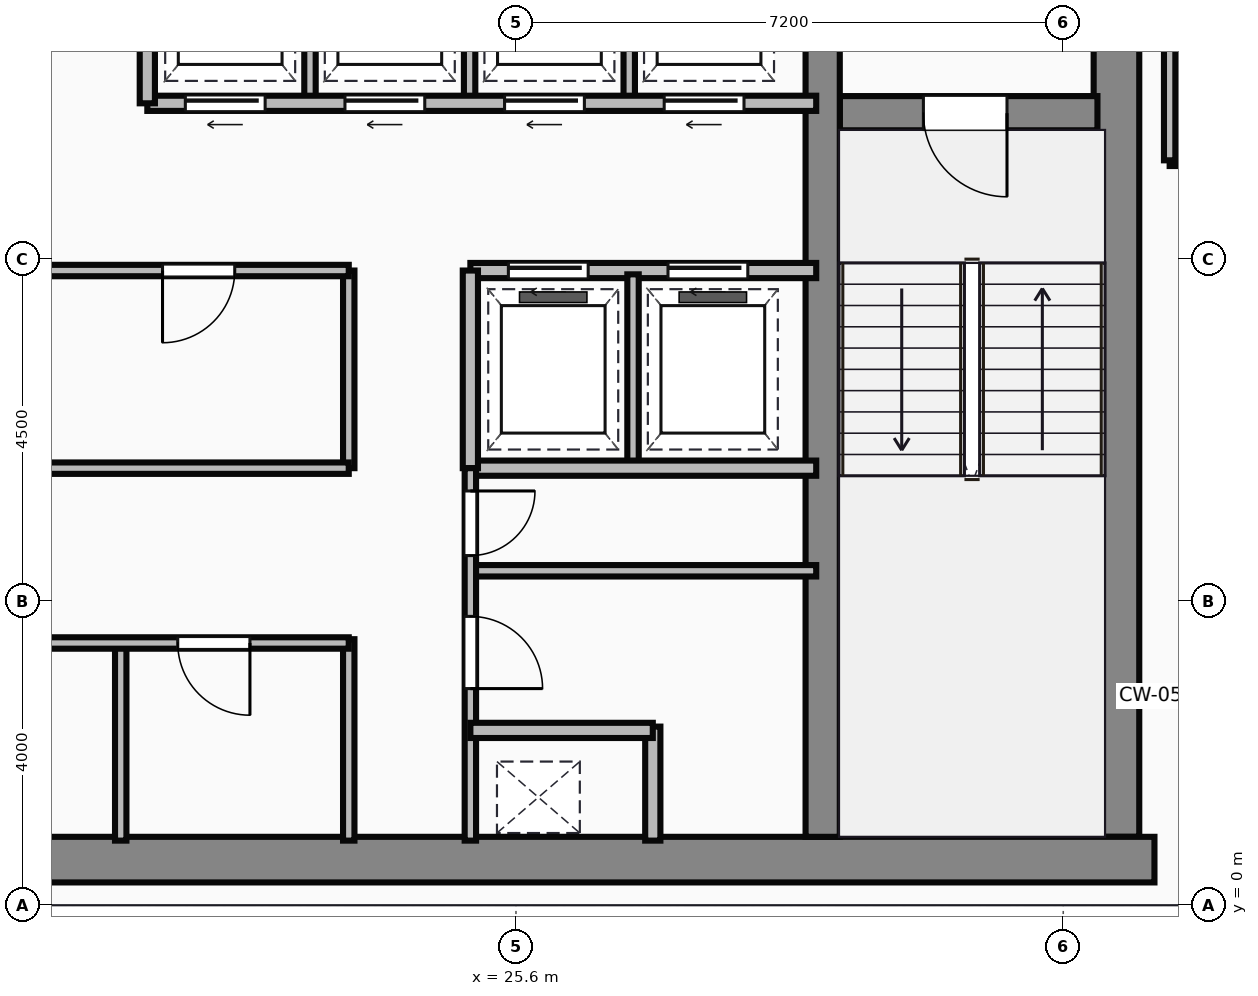
"""IFC4 building model, lengths in metres.
Left out: names, types, materials, properties, quantities, classifications, styles, units other than length and angle.
Written with IfcOpenShell. Run it as: python <this file> out.ifc"""

import sys

from ifc_helpers import new_model, si_unit, direction, frame, frame_2d, origin, place, context, subcontext, project, spatial, rectangle, extrude, source, transform, mapped, element, fill, save


model = new_model("IFC4")
c1 = context("Model", 3, precision=1e-05, world=origin(), true_north=direction((0.0, 1.0)))
c2 = subcontext(c1, "Body", "Model", "MODEL_VIEW")
j1 = project(units=[si_unit("LENGTHUNIT", "METRE"), si_unit("PLANEANGLEUNIT", "RADIAN")], contexts=[c1])
p1 = place(None, origin())
s1 = spatial("IfcSite", under=j1, at=p1, CompositionType="ELEMENT")
p2 = place(p1, origin())
s2 = spatial("IfcBuilding", under=s1, at=p2, CompositionType="ELEMENT")
p3 = place(p2, frame((0.0, 0.0, 262.45)))
s3 = spatial("IfcBuildingStorey", under=s2, at=p3, CompositionType="ELEMENT", Elevation=262.45)
m1 = source(origin(), c2, "Body", "SweptSolid", [
    extrude(rectangle(XDim=29.5, YDim=0.6, at=frame_2d((14.75, 0.0))), origin(), (0.0, 0.0, 1.0), 3.65),
])
p4 = place(p3, frame((4.5, 0.6, 0.0), z_axis=(0.0, 0.0, 1.0), x_axis=(1.0, 0.0, 0.0)))
e1 = element("IfcWall", 1, at=p4, inside=s3, PredefinedType="SHEAR", context=c2, shape_type="MappedRepresentation", body=[
    mapped(m1, transform((0.0, 0.0, 0.0))),
])
m2 = source(origin(), c2, "Body", "SweptSolid", [
    extrude(rectangle(XDim=13.1, YDim=0.6, at=frame_2d((6.55, 0.0))), origin(), (0.0, 0.0, 1.0), 3.65),
])
p5 = place(p3, frame((33.5, 0.9, 0.0), z_axis=(0.0, 0.0, 1.0), x_axis=(0.0, 1.0, 0.0)))
e2 = element("IfcWall", 2, at=p5, inside=s3, PredefinedType="SHEAR", context=c2, shape_type="MappedRepresentation", body=[
    mapped(m2, transform((0.0, 0.0, 0.0))),
])
m3 = source(origin(), c2, "Body", "SweptSolid", [
    extrude(rectangle(XDim=12.5, YDim=0.45, at=frame_2d((6.25, 0.0))), origin(), (0.0, 0.0, 1.0), 3.65),
])
p6 = place(p3, frame((29.635, 0.9, 0.0), z_axis=(0.0, 0.0, 1.0), x_axis=(0.0, 1.0, 0.0)))
e3 = element("IfcWall", 3, at=p6, inside=s3, PredefinedType="SHEAR", context=c2, shape_type="MappedRepresentation", body=[
    mapped(m3, transform((0.0, 0.0, 0.0))),
])
m4 = source(origin(), c2, "Body", "SweptSolid", [
    extrude(rectangle(XDim=3.39, YDim=0.45, at=frame_2d((1.695, 0.0))), origin(), (0.0, 0.0, 1.0), 3.65),
])
p7 = place(p3, frame((29.86, 10.42, 0.0), z_axis=(0.0, 0.0, 1.0), x_axis=(1.0, 0.0, 0.0)))
e4 = element("IfcWall", 4, at=p7, inside=s3, PredefinedType="SHEAR", context=c2, shape_type="MappedRepresentation", body=[
    mapped(m4, transform((0.0, 0.0, 0.0))),
])
p8 = place(p7, frame((1.1, 0.0, 0.0)))
e5 = element("IfcOpeningElement", 5, at=p8, cuts=e4, PredefinedType="OPENING", context=c2, shape_type="SweptSolid", body=[
    extrude(rectangle(XDim=1.1, YDim=2.15, at=frame_2d((0.55, 1.075))), frame((0.0, 0.235, 0.0), z_axis=(0.0, -1.0, 0.0), x_axis=(1.0, 0.0, 0.0)), (0.0, 0.0, 1.0), 0.47),
])
m5 = source(origin(), c2, "Body", "SweptSolid", [
    extrude(rectangle(XDim=10.35, YDim=0.15, at=frame_2d((5.175, 0.0))), origin(), (0.0, 0.0, 1.0), 3.4),
])
p9 = place(p3, frame((13.05, 3.45, 0.0), z_axis=(0.0, 0.0, 1.0), x_axis=(1.0, 0.0, 0.0)))
e6 = element("IfcWall", 6, at=p9, inside=s3, PredefinedType="PARTITIONING", context=c2, shape_type="MappedRepresentation", body=[
    mapped(m5, transform((0.0, 0.0, 0.0))),
])
p10 = place(p9, frame((3.8, 0.0, 0.0)))
e7 = element("IfcOpeningElement", 7, at=p10, cuts=e6, PredefinedType="OPENING", context=c2, shape_type="SweptSolid", body=[
    extrude(rectangle(XDim=0.95, YDim=2.15, at=frame_2d((0.475, 1.075))), frame((0.0, 0.085, 0.0), z_axis=(0.0, -1.0, 0.0), x_axis=(1.0, 0.0, 0.0)), (0.0, 0.0, 1.0), 0.17),
])
p11 = place(p9, frame((8.1, 0.0, 0.0)))
e8 = element("IfcOpeningElement", 8, at=p11, cuts=e6, PredefinedType="OPENING", context=c2, shape_type="SweptSolid", body=[
    extrude(rectangle(XDim=0.95, YDim=2.15, at=frame_2d((0.475, 1.075))), frame((0.0, 0.085, 0.0), z_axis=(0.0, -1.0, 0.0), x_axis=(1.0, 0.0, 0.0)), (0.0, 0.0, 1.0), 0.17),
])
m6 = source(origin(), c2, "Body", "SweptSolid", [
    extrude(rectangle(XDim=2.65, YDim=0.15, at=frame_2d((1.325, 0.0))), origin(), (0.0, 0.0, 1.0), 3.4),
])
p12 = place(p3, frame((23.4, 0.85, 0.0), z_axis=(0.0, 0.0, 1.0), x_axis=(0.0, 1.0, 0.0)))
e9 = element("IfcWall", 9, at=p12, inside=s3, PredefinedType="PARTITIONING", context=c2, shape_type="MappedRepresentation", body=[
    mapped(m6, transform((0.0, 0.0, 0.0))),
])
m7 = source(origin(), c2, "Body", "SweptSolid", [
    extrude(rectangle(XDim=2.6, YDim=0.15, at=frame_2d((1.3, 0.0))), origin(), (0.0, 0.0, 1.0), 3.4),
])
p13 = place(p3, frame((20.4, 0.85, 0.0), z_axis=(0.0, 0.0, 1.0), x_axis=(0.0, 1.0, 0.0)))
e10 = element("IfcWall", 10, at=p13, inside=s3, PredefinedType="PARTITIONING", context=c2, shape_type="MappedRepresentation", body=[
    mapped(m7, transform((0.0, 0.0, 0.0))),
])
m8 = source(origin(), c2, "Body", "SweptSolid", [
    extrude(rectangle(XDim=11.85, YDim=0.15, at=frame_2d((5.925, 0.0))), origin(), (0.0, 0.0, 1.0), 3.4),
])
p14 = place(p3, frame((11.55, 5.75, 0.0), z_axis=(0.0, 0.0, 1.0), x_axis=(1.0, 0.0, 0.0)))
e11 = element("IfcWall", 11, at=p14, inside=s3, PredefinedType="PARTITIONING", context=c2, shape_type="MappedRepresentation", body=[
    mapped(m8, transform((0.0, 0.0, 0.0))),
])
p15 = place(p3, frame((11.55, 8.35, 0.0), z_axis=(0.0, 0.0, 1.0), x_axis=(1.0, 0.0, 0.0)))
e12 = element("IfcWall", 12, at=p15, inside=s3, PredefinedType="PARTITIONING", context=c2, shape_type="MappedRepresentation", body=[
    mapped(m8, transform((0.0, 0.0, 0.0))),
])
p16 = place(p15, frame((1.1, 0.0, 0.0)))
e13 = element("IfcOpeningElement", 13, at=p16, cuts=e12, PredefinedType="OPENING", context=c2, shape_type="SweptSolid", body=[
    extrude(rectangle(XDim=0.95, YDim=2.15, at=frame_2d((0.475, 1.075))), frame((0.0, 0.085, 0.0), z_axis=(0.0, -1.0, 0.0), x_axis=(1.0, 0.0, 0.0)), (0.0, 0.0, 1.0), 0.17),
])
p17 = place(p15, frame((9.4, 0.0, 0.0)))
e14 = element("IfcOpeningElement", 14, at=p17, cuts=e12, PredefinedType="OPENING", context=c2, shape_type="SweptSolid", body=[
    extrude(rectangle(XDim=0.95, YDim=2.15, at=frame_2d((0.475, 1.075))), frame((0.0, 0.085, 0.0), z_axis=(0.0, -1.0, 0.0), x_axis=(1.0, 0.0, 0.0)), (0.0, 0.0, 1.0), 0.17),
])
m9 = source(origin(), c2, "Body", "SweptSolid", [
    extrude(rectangle(XDim=2.6, YDim=0.15, at=frame_2d((1.3, 0.0))), origin(), (0.0, 0.0, 1.0), 3.4),
])
p18 = place(p3, frame((23.4, 5.75, 0.0), z_axis=(0.0, 0.0, 1.0), x_axis=(0.0, 1.0, 0.0)))
e15 = element("IfcWall", 15, at=p18, inside=s3, PredefinedType="PARTITIONING", context=c2, shape_type="MappedRepresentation", body=[
    mapped(m9, transform((0.0, 0.0, 0.0))),
])
m10 = source(origin(), c2, "Body", "SweptSolid", [
    extrude(rectangle(XDim=8.8, YDim=0.2, at=frame_2d((4.4, 0.0))), origin(), (0.0, 0.0, 1.0), 3.4),
])
p19 = place(p3, frame((20.75, 10.55, 0.0), z_axis=(0.0, 0.0, 1.0), x_axis=(1.0, 0.0, 0.0)))
e16 = element("IfcWall", 16, at=p19, inside=s3, PredefinedType="PARTITIONING", context=c2, shape_type="MappedRepresentation", body=[
    mapped(m10, transform((0.0, 0.0, 0.0))),
])
p20 = place(p19, frame((0.5, 0.0, 0.0)))
e17 = element("IfcOpeningElement", 17, at=p20, cuts=e16, PredefinedType="OPENING", context=c2, shape_type="SweptSolid", body=[
    extrude(rectangle(XDim=1.05, YDim=2.15, at=frame_2d((0.525, 1.075))), frame((0.0, 0.11, 0.0), z_axis=(0.0, -1.0, 0.0), x_axis=(1.0, 0.0, 0.0)), (0.0, 0.0, 1.0), 0.22),
])
p21 = place(p19, frame((2.6, 0.0, 0.0)))
e18 = element("IfcOpeningElement", 18, at=p21, cuts=e16, PredefinedType="OPENING", context=c2, shape_type="SweptSolid", body=[
    extrude(rectangle(XDim=1.05, YDim=2.15, at=frame_2d((0.525, 1.075))), frame((0.0, 0.11, 0.0), z_axis=(0.0, -1.0, 0.0), x_axis=(1.0, 0.0, 0.0)), (0.0, 0.0, 1.0), 0.22),
])
p22 = place(p19, frame((4.7, 0.0, 0.0)))
e19 = element("IfcOpeningElement", 19, at=p22, cuts=e16, PredefinedType="OPENING", context=c2, shape_type="SweptSolid", body=[
    extrude(rectangle(XDim=1.05, YDim=2.15, at=frame_2d((0.525, 1.075))), frame((0.0, 0.11, 0.0), z_axis=(0.0, -1.0, 0.0), x_axis=(1.0, 0.0, 0.0)), (0.0, 0.0, 1.0), 0.22),
])
p23 = place(p19, frame((6.8, 0.0, 0.0)))
e20 = element("IfcOpeningElement", 20, at=p23, cuts=e16, PredefinedType="OPENING", context=c2, shape_type="SweptSolid", body=[
    extrude(rectangle(XDim=1.05, YDim=2.15, at=frame_2d((0.525, 1.075))), frame((0.0, 0.11, 0.0), z_axis=(0.0, -1.0, 0.0), x_axis=(1.0, 0.0, 0.0)), (0.0, 0.0, 1.0), 0.22),
])
m11 = source(origin(), c2, "Body", "SweptSolid", [
    extrude(rectangle(XDim=3.0, YDim=0.2, at=frame_2d((1.5, 0.0))), origin(), (0.0, 0.0, 1.0), 3.4),
])
p24 = place(p3, frame((20.75, 10.55, 0.0), z_axis=(0.0, 0.0, 1.0), x_axis=(0.0, 1.0, 0.0)))
e21 = element("IfcWall", 21, at=p24, inside=s3, PredefinedType="PARTITIONING", context=c2, shape_type="MappedRepresentation", body=[
    mapped(m11, transform((0.0, 0.0, 0.0))),
])
m12 = source(origin(), c2, "Body", "SweptSolid", [
    extrude(rectangle(XDim=2.85, YDim=0.15, at=frame_2d((1.425, 0.0))), origin(), (0.0, 0.0, 1.0), 3.4),
])
for number, where, z_axis, x_axis in (
    (22, (22.89, 10.6, 0.0), (0.0, 0.0, 1.0), (0.0, 1.0, 0.0)),
    (23, (24.99, 10.6, 0.0), (0.0, 0.0, 1.0), (0.0, 1.0, 0.0)),
    (24, (27.09, 10.6, 0.0), (0.0, 0.0, 1.0), (0.0, 1.0, 0.0)),
):
    element("IfcWall", number, at=place(p3, frame(where, z_axis=z_axis, x_axis=x_axis)), inside=s3, PredefinedType="PARTITIONING", context=c2, shape_type="MappedRepresentation", body=[
        mapped(m12, transform((0.0, 0.0, 0.0))),
    ])
m13 = source(origin(), c2, "Body", "SweptSolid", [
    extrude(rectangle(XDim=4.55, YDim=0.2, at=frame_2d((2.275, 0.0))), origin(), (0.0, 0.0, 1.0), 3.4),
])
p25 = place(p3, frame((25.0, 8.35, 0.0), z_axis=(0.0, 0.0, 1.0), x_axis=(1.0, 0.0, 0.0)))
e25 = element("IfcWall", 25, at=p25, inside=s3, PredefinedType="PARTITIONING", context=c2, shape_type="MappedRepresentation", body=[
    mapped(m13, transform((0.0, 0.0, 0.0))),
])
p26 = place(p25, frame((0.5, 0.0, 0.0)))
e26 = element("IfcOpeningElement", 26, at=p26, cuts=e25, PredefinedType="OPENING", context=c2, shape_type="SweptSolid", body=[
    extrude(rectangle(XDim=1.05, YDim=2.15, at=frame_2d((0.525, 1.075))), frame((0.0, 0.11, 0.0), z_axis=(0.0, -1.0, 0.0), x_axis=(1.0, 0.0, 0.0)), (0.0, 0.0, 1.0), 0.22),
])
p27 = place(p25, frame((2.6, 0.0, 0.0)))
e27 = element("IfcOpeningElement", 27, at=p27, cuts=e25, PredefinedType="OPENING", context=c2, shape_type="SweptSolid", body=[
    extrude(rectangle(XDim=1.05, YDim=2.15, at=frame_2d((0.525, 1.075))), frame((0.0, 0.11, 0.0), z_axis=(0.0, -1.0, 0.0), x_axis=(1.0, 0.0, 0.0)), (0.0, 0.0, 1.0), 0.22),
])
p28 = place(p3, frame((25.0, 5.75, 0.0), z_axis=(0.0, 0.0, 1.0), x_axis=(1.0, 0.0, 0.0)))
e28 = element("IfcWall", 28, at=p28, inside=s3, PredefinedType="PARTITIONING", context=c2, shape_type="MappedRepresentation", body=[
    mapped(m13, transform((0.0, 0.0, 0.0))),
])
m14 = source(origin(), c2, "Body", "SweptSolid", [
    extrude(rectangle(XDim=2.6, YDim=0.2, at=frame_2d((1.3, 0.0))), origin(), (0.0, 0.0, 1.0), 3.4),
])
p29 = place(p3, frame((25.0, 5.75, 0.0), z_axis=(0.0, 0.0, 1.0), x_axis=(0.0, 1.0, 0.0)))
e29 = element("IfcWall", 29, at=p29, inside=s3, PredefinedType="PARTITIONING", context=c2, shape_type="MappedRepresentation", body=[
    mapped(m14, transform((0.0, 0.0, 0.0))),
])
m15 = source(origin(), c2, "Body", "SweptSolid", [
    extrude(rectangle(XDim=2.5, YDim=0.15, at=frame_2d((1.25, 0.0))), origin(), (0.0, 0.0, 1.0), 3.4),
])
p30 = place(p3, frame((27.14, 5.8, 0.0), z_axis=(0.0, 0.0, 1.0), x_axis=(0.0, 1.0, 0.0)))
e30 = element("IfcWall", 30, at=p30, inside=s3, PredefinedType="PARTITIONING", context=c2, shape_type="MappedRepresentation", body=[
    mapped(m15, transform((0.0, 0.0, 0.0))),
])
m16 = source(origin(), c2, "Body", "SweptSolid", [
    extrude(rectangle(XDim=4.9, YDim=0.15, at=frame_2d((2.45, 0.0))), origin(), (0.0, 0.0, 1.0), 3.4),
])
p31 = place(p3, frame((25.0, 0.85, 0.0), z_axis=(0.0, 0.0, 1.0), x_axis=(0.0, 1.0, 0.0)))
e31 = element("IfcWall", 31, at=p31, inside=s3, PredefinedType="PARTITIONING", context=c2, shape_type="MappedRepresentation", body=[
    mapped(m16, transform((0.0, 0.0, 0.0))),
])
p32 = place(p31, frame((2.0, 0.0, 0.0)))
e32 = element("IfcOpeningElement", 32, at=p32, cuts=e31, PredefinedType="OPENING", context=c2, shape_type="SweptSolid", body=[
    extrude(rectangle(XDim=0.95, YDim=2.15, at=frame_2d((0.475, 1.075))), frame((0.0, 0.085, 0.0), z_axis=(0.0, -1.0, 0.0), x_axis=(1.0, 0.0, 0.0)), (0.0, 0.0, 1.0), 0.17),
])
p33 = place(p31, frame((3.75, 0.0, 0.0)))
e33 = element("IfcOpeningElement", 33, at=p33, cuts=e31, PredefinedType="OPENING", context=c2, shape_type="SweptSolid", body=[
    extrude(rectangle(XDim=0.85, YDim=2.15, at=frame_2d((0.425, 1.075))), frame((0.0, 0.085, 0.0), z_axis=(0.0, -1.0, 0.0), x_axis=(1.0, 0.0, 0.0)), (0.0, 0.0, 1.0), 0.17),
])
m17 = source(origin(), c2, "Body", "SweptSolid", [
    extrude(rectangle(XDim=2.4, YDim=0.2, at=frame_2d((1.2, 0.0))), origin(), (0.0, 0.0, 1.0), 3.4),
])
p34 = place(p3, frame((25.0, 2.3, 0.0), z_axis=(0.0, 0.0, 1.0), x_axis=(1.0, 0.0, 0.0)))
e34 = element("IfcWall", 34, at=p34, inside=s3, PredefinedType="PARTITIONING", context=c2, shape_type="MappedRepresentation", body=[
    mapped(m17, transform((0.0, 0.0, 0.0))),
])
m18 = source(origin(), c2, "Body", "SweptSolid", [
    extrude(rectangle(XDim=1.5, YDim=0.2, at=frame_2d((0.75, 0.0))), origin(), (0.0, 0.0, 1.0), 3.4),
])
p35 = place(p3, frame((27.4, 0.85, 0.0), z_axis=(0.0, 0.0, 1.0), x_axis=(0.0, 1.0, 0.0)))
e35 = element("IfcWall", 35, at=p35, inside=s3, PredefinedType="PARTITIONING", context=c2, shape_type="MappedRepresentation", body=[
    mapped(m18, transform((0.0, 0.0, 0.0))),
])
m19 = source(origin(), c2, "Body", "SweptSolid", [
    extrude(rectangle(XDim=4.55, YDim=0.15, at=frame_2d((2.275, 0.0))), origin(), (0.0, 0.0, 1.0), 3.4),
])
p36 = place(p3, frame((25.0, 4.4, 0.0), z_axis=(0.0, 0.0, 1.0), x_axis=(1.0, 0.0, 0.0)))
e36 = element("IfcWall", 36, at=p36, inside=s3, PredefinedType="PARTITIONING", context=c2, shape_type="MappedRepresentation", body=[
    mapped(m19, transform((0.0, 0.0, 0.0))),
])
m20 = source(origin(), c2, "Body", "SweptSolid", [
    extrude(rectangle(XDim=4.8, YDim=0.15, at=frame_2d((2.4, 0.0))), origin(), (0.0, 0.0, 1.0), 3.4),
])
p37 = place(p3, frame((34.2, 9.8, 0.0), z_axis=(0.0, 0.0, 1.0), x_axis=(1.0, 0.0, 0.0)))
e37 = element("IfcWall", 37, at=p37, inside=s3, PredefinedType="PARTITIONING", context=c2, shape_type="MappedRepresentation", body=[
    mapped(m20, transform((0.0, 0.0, 0.0))),
])
m21 = source(origin(), c2, "Body", "SweptSolid", [
    extrude(rectangle(XDim=4.18, YDim=0.15, at=frame_2d((2.09, 0.0))), origin(), (0.0, 0.0, 1.0), 3.4),
])
p38 = place(p3, frame((34.2, 9.8, 0.0), z_axis=(0.0, 0.0, 1.0), x_axis=(0.0, 1.0, 0.0)))
e38 = element("IfcWall", 38, at=p38, inside=s3, PredefinedType="PARTITIONING", context=c2, shape_type="MappedRepresentation", body=[
    mapped(m21, transform((0.0, 0.0, 0.0))),
])
m22 = source(origin(), c2, "Body", "SweptSolid", [
    extrude(rectangle(XDim=1.1, YDim=2.15, at=frame_2d((0.55, 1.075))), frame((0.0, 0.025, 0.0), z_axis=(0.0, -1.0, 0.0), x_axis=(1.0, 0.0, 0.0)), (0.0, 0.0, 1.0), 0.05),
])
p39 = place(p8, frame((1.1, 0.0, 0.0), z_axis=(0.0, 0.0, 1.0), x_axis=(-1.0, 0.0, 0.0)))
e39 = element("IfcDoor", 39, at=p39, inside=s3, OperationType="SINGLE_SWING_RIGHT", PredefinedType="DOOR", context=c2, shape_type="MappedRepresentation", body=[
    mapped(m22, transform((0.0, 0.0, 0.0))),
])
fill(e5, e39)
m23 = source(origin(), c2, "Body", "SweptSolid", [
    extrude(rectangle(XDim=0.95, YDim=2.15, at=frame_2d((0.475, 1.075))), frame((0.0, 0.025, 0.0), z_axis=(0.0, -1.0, 0.0), x_axis=(1.0, 0.0, 0.0)), (0.0, 0.0, 1.0), 0.05),
])
p40 = place(p11, origin())
e40 = element("IfcDoor", 40, at=p40, inside=s3, OperationType="SINGLE_SWING_RIGHT", PredefinedType="DOOR", context=c2, shape_type="MappedRepresentation", body=[
    mapped(m23, transform((0.0, 0.0, 0.0))),
])
fill(e8, e40)
p41 = place(p17, origin())
e41 = element("IfcDoor", 41, at=p41, inside=s3, OperationType="SINGLE_SWING_LEFT", PredefinedType="DOOR", context=c2, shape_type="MappedRepresentation", body=[
    mapped(m23, transform((0.0, 0.0, 0.0))),
])
fill(e14, e41)
m24 = source(origin(), c2, "Body", "SweptSolid", [
    extrude(rectangle(XDim=1.05, YDim=2.15, at=frame_2d((0.525, 1.075))), frame((0.0, 0.025, 0.0), z_axis=(0.0, -1.0, 0.0), x_axis=(1.0, 0.0, 0.0)), (0.0, 0.0, 1.0), 0.05),
])
p42 = place(p20, frame((1.05, 0.0, 0.0), z_axis=(0.0, 0.0, 1.0), x_axis=(-1.0, 0.0, 0.0)))
e42 = element("IfcDoor", 42, at=p42, inside=s3, OperationType="SLIDING_TO_LEFT", PredefinedType="DOOR", context=c2, shape_type="MappedRepresentation", body=[
    mapped(m24, transform((0.0, 0.0, 0.0))),
])
fill(e17, e42)
p43 = place(p21, frame((1.05, 0.0, 0.0), z_axis=(0.0, 0.0, 1.0), x_axis=(-1.0, 0.0, 0.0)))
e43 = element("IfcDoor", 43, at=p43, inside=s3, OperationType="SLIDING_TO_LEFT", PredefinedType="DOOR", context=c2, shape_type="MappedRepresentation", body=[
    mapped(m24, transform((0.0, 0.0, 0.0))),
])
fill(e18, e43)
p44 = place(p22, frame((1.05, 0.0, 0.0), z_axis=(0.0, 0.0, 1.0), x_axis=(-1.0, 0.0, 0.0)))
e44 = element("IfcDoor", 44, at=p44, inside=s3, OperationType="SLIDING_TO_LEFT", PredefinedType="DOOR", context=c2, shape_type="MappedRepresentation", body=[
    mapped(m24, transform((0.0, 0.0, 0.0))),
])
fill(e19, e44)
p45 = place(p23, frame((1.05, 0.0, 0.0), z_axis=(0.0, 0.0, 1.0), x_axis=(-1.0, 0.0, 0.0)))
e45 = element("IfcDoor", 45, at=p45, inside=s3, OperationType="SLIDING_TO_LEFT", PredefinedType="DOOR", context=c2, shape_type="MappedRepresentation", body=[
    mapped(m24, transform((0.0, 0.0, 0.0))),
])
fill(e20, e45)
p46 = place(p26, origin())
e46 = element("IfcDoor", 46, at=p46, inside=s3, OperationType="SLIDING_TO_LEFT", PredefinedType="DOOR", context=c2, shape_type="MappedRepresentation", body=[
    mapped(m24, transform((0.0, 0.0, 0.0))),
])
fill(e26, e46)
p47 = place(p27, origin())
e47 = element("IfcDoor", 47, at=p47, inside=s3, OperationType="SLIDING_TO_LEFT", PredefinedType="DOOR", context=c2, shape_type="MappedRepresentation", body=[
    mapped(m24, transform((0.0, 0.0, 0.0))),
])
fill(e27, e47)
p48 = place(p32, origin())
e48 = element("IfcDoor", 48, at=p48, inside=s3, OperationType="SINGLE_SWING_LEFT", PredefinedType="DOOR", context=c2, shape_type="MappedRepresentation", body=[
    mapped(m23, transform((0.0, 0.0, 0.0))),
])
fill(e32, e48)
m25 = source(origin(), c2, "Body", "SweptSolid", [
    extrude(rectangle(XDim=0.85, YDim=2.15, at=frame_2d((0.425, 1.075))), frame((0.0, 0.025, 0.0), z_axis=(0.0, -1.0, 0.0), x_axis=(1.0, 0.0, 0.0)), (0.0, 0.0, 1.0), 0.05),
])
p49 = place(p33, origin())
e49 = element("IfcDoor", 49, at=p49, inside=s3, OperationType="SINGLE_SWING_RIGHT", PredefinedType="DOOR", context=c2, shape_type="MappedRepresentation", body=[
    mapped(m25, transform((0.0, 0.0, 0.0))),
])
fill(e33, e49)
save(model, sys.argv[1])
